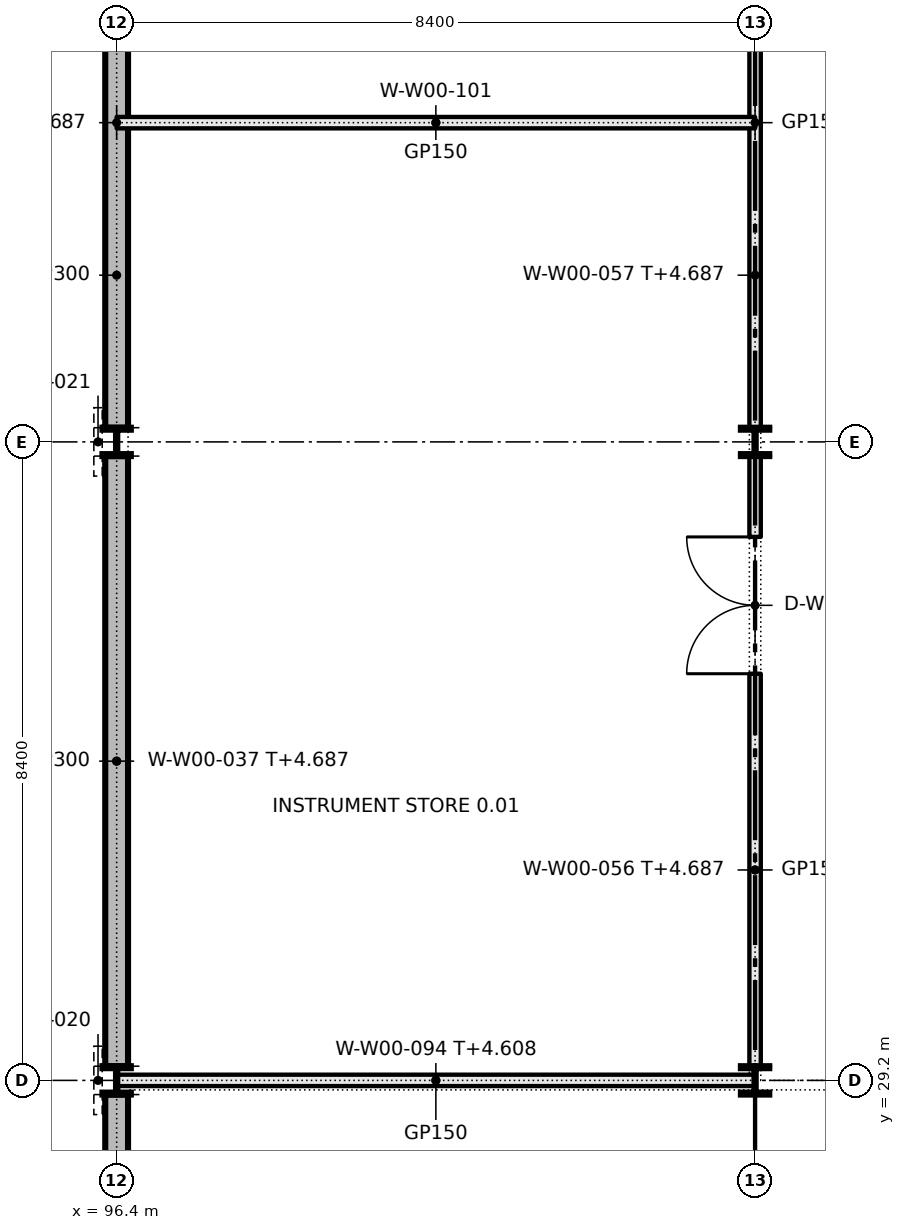
"""IFC4 building model, lengths in metres.
Left out: names, types, materials, properties, quantities, classifications, styles, units other than length and angle.
Written with IfcOpenShell. Run it as: python <this file> out.ifc"""

import sys

from ifc_helpers import new_model, si_unit, direction, frame, frame_2d, origin, origin_2d, place, context, subcontext, project, spatial, rectangle, i_section, extrude, element, fill, save


model = new_model("IFC4")
c1 = context("Model", 3, precision=1e-05, world=origin(), true_north=direction((0.0, 1.0)))
c2 = subcontext(c1, "Body", "Model", "MODEL_VIEW")
j1 = project(units=[si_unit("LENGTHUNIT", "METRE"), si_unit("PLANEANGLEUNIT", "RADIAN")], contexts=[c1])
p1 = place(None, origin())
s1 = spatial("IfcSite", under=j1, at=p1, CompositionType="ELEMENT")
p2 = place(p1, origin())
s2 = spatial("IfcBuilding", under=s1, at=p2, CompositionType="ELEMENT")
p3 = place(p2, origin())
s3 = spatial("IfcBuildingStorey", under=s2, at=p3, CompositionType="ELEMENT", Elevation=0.0)
for number, where, z_axis, x_axis in (
    (1, (96.4, 29.2, 0.0), (0.0, 0.0, 1.0), (1.0, 0.0, 0.0)),
    (2, (96.4, 37.6, 0.0), (0.0, 0.0, 1.0), (1.0, 0.0, 0.0)),
    (3, (104.8, 29.2, 0.0), (0.0, 0.0, 1.0), (1.0, 0.0, 0.0)),
    (4, (104.8, 37.6, 0.0), (0.0, 0.0, 1.0), (1.0, 0.0, 0.0)),
):
    element("IfcColumn", number, at=place(p3, frame(where, z_axis=z_axis, x_axis=x_axis)), inside=s3, PredefinedType="COLUMN", context=c2, shape_type="SweptSolid", body=[
        extrude(i_section(OverallWidth=0.373, OverallDepth=0.373, WebThickness=0.016, FlangeThickness=0.026, FilletRadius=0.015, at=origin_2d()), origin(), (0.0, 0.0, 1.0), 5.4),
    ])
p4 = place(p3, frame((96.4, 20.987, 0.0), z_axis=(0.0, 0.0, 1.0), x_axis=(0.0, 1.0, 0.0)))
e5 = element("IfcWall", 5, at=p4, inside=s3, PredefinedType="SOLIDWALL", context=c2, shape_type="SweptSolid", body=[
    extrude(rectangle(XDim=8.027, YDim=0.3, at=frame_2d((4.013, 0.0))), origin(), (0.0, 0.0, 1.0), 4.687),
])
for number, where, z_axis, x_axis in (
    (6, (96.4, 29.387, 0.0), (0.0, 0.0, 1.0), (0.0, 1.0, 0.0)),
    (7, (96.4, 37.787, 0.0), (0.0, 0.0, 1.0), (0.0, 1.0, 0.0)),
):
    element("IfcWall", number, at=place(p3, frame(where, z_axis=z_axis, x_axis=x_axis)), inside=s3, PredefinedType="SOLIDWALL", context=c2, shape_type="SweptSolid", body=[
        extrude(rectangle(XDim=8.027, YDim=0.3, at=frame_2d((4.013, 0.0))), origin(), (0.0, 0.0, 1.0), 4.687),
    ])
p5 = place(p3, frame((104.8, 29.387, 0.0), z_axis=(0.0, 0.0, 1.0), x_axis=(0.0, 1.0, 0.0)))
e8 = element("IfcWall", 8, at=p5, inside=s3, PredefinedType="PARTITIONING", context=c2, shape_type="SweptSolid", body=[
    extrude(rectangle(XDim=8.027, YDim=0.15, at=frame_2d((4.013, 0.0))), origin(), (0.0, 0.0, 1.0), 4.687),
])
p6 = place(p5, frame((5.163, 0.0, 0.0)))
e9 = element("IfcOpeningElement", 9, at=p6, cuts=e8, PredefinedType="OPENING", context=c2, shape_type="SweptSolid", body=[
    extrude(rectangle(XDim=1.8, YDim=2.1, at=frame_2d((0.9, 1.05))), frame((0.0, 0.085, 0.0), z_axis=(0.0, -1.0, 0.0), x_axis=(1.0, 0.0, 0.0)), (0.0, 0.0, 1.0), 0.17),
])
p7 = place(p3, frame((104.8, 37.787, 0.0), z_axis=(0.0, 0.0, 1.0), x_axis=(0.0, 1.0, 0.0)))
e10 = element("IfcWall", 10, at=p7, inside=s3, PredefinedType="PARTITIONING", context=c2, shape_type="SweptSolid", body=[
    extrude(rectangle(XDim=8.027, YDim=0.15, at=frame_2d((4.013, 0.0))), origin(), (0.0, 0.0, 1.0), 4.687),
])
p8 = place(p3, frame((96.408, 29.2, 0.0), z_axis=(0.0, 0.0, 1.0), x_axis=(1.0, 0.0, 0.0)))
e11 = element("IfcWall", 11, at=p8, inside=s3, PredefinedType="PARTITIONING", context=c2, shape_type="SweptSolid", body=[
    extrude(rectangle(XDim=8.384, YDim=0.15, at=frame_2d((4.192, 0.0))), origin(), (0.0, 0.0, 1.0), 4.608),
])
p9 = place(p3, frame((96.4, 41.8, 0.0), z_axis=(0.0, 0.0, 1.0), x_axis=(1.0, 0.0, 0.0)))
e12 = element("IfcWall", 12, at=p9, inside=s3, PredefinedType="PARTITIONING", context=c2, shape_type="SweptSolid", body=[
    extrude(rectangle(XDim=8.4, YDim=0.15, at=frame_2d((4.2, 0.0))), origin(), (0.0, 0.0, 1.0), 5.4),
])
p10 = place(p6, origin())
e13 = element("IfcDoor", 13, at=p10, inside=s3, OperationType="DOUBLE_DOOR_SINGLE_SWING", PredefinedType="DOOR", context=c2, shape_type="SweptSolid", body=[
    extrude(rectangle(XDim=1.8, YDim=2.1, at=frame_2d((0.9, 1.05))), frame((0.0, 0.025, 0.0), z_axis=(0.0, -1.0, 0.0), x_axis=(1.0, 0.0, 0.0)), (0.0, 0.0, 1.0), 0.05),
])
fill(e9, e13)
save(model, sys.argv[1])
